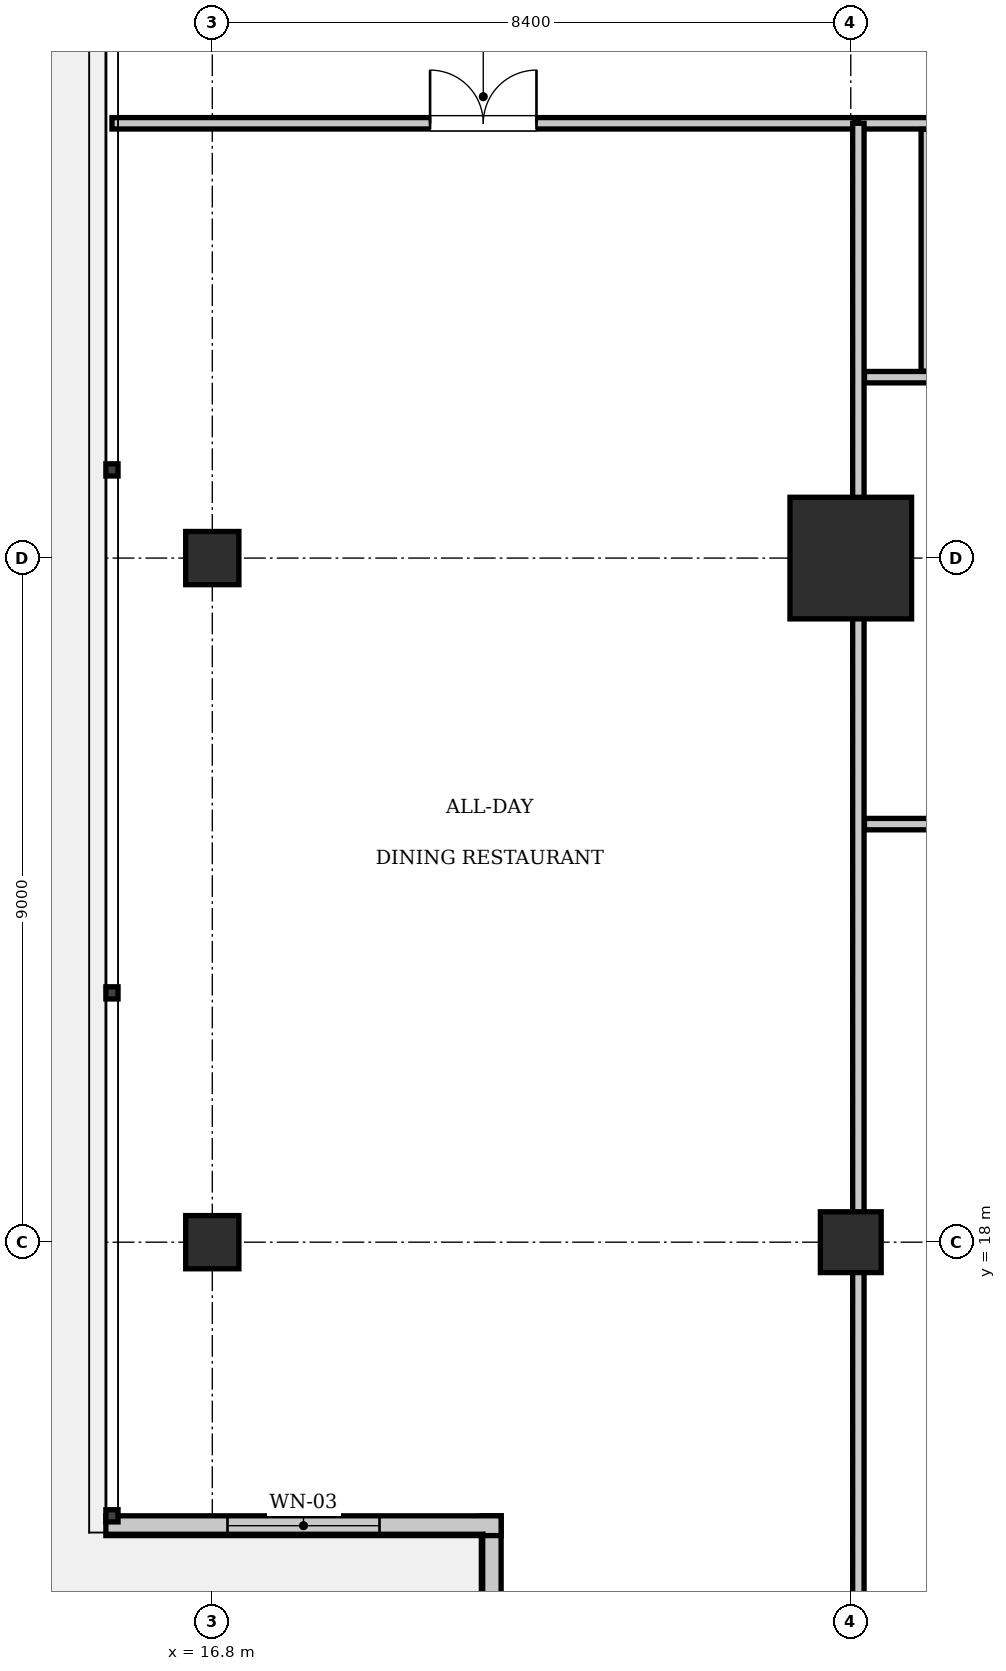
"""IFC4 building model, lengths in metres.
Left out: names, types, materials, properties, quantities, classifications, styles, units other than length and angle.
Written with IfcOpenShell. Run it as: python <this file> out.ifc"""

import sys

from ifc_helpers import new_model, si_unit, direction, frame, frame_2d, origin, origin_2d, place, context, subcontext, project, spatial, rectangle, extrude, element, fill, save


model = new_model("IFC4")
c1 = context("Model", 3, precision=1e-05, world=origin(), true_north=direction((0.0, 1.0)))
c2 = subcontext(c1, "Body", "Model", "MODEL_VIEW")
j1 = project(units=[si_unit("LENGTHUNIT", "METRE"), si_unit("PLANEANGLEUNIT", "RADIAN")], contexts=[c1])
p1 = place(None, origin())
s1 = spatial("IfcSite", under=j1, at=p1, CompositionType="ELEMENT")
p2 = place(p1, origin())
s2 = spatial("IfcBuilding", under=s1, at=p2, CompositionType="ELEMENT")
p3 = place(p2, frame((0.0, 0.0, 234.5)))
s3 = spatial("IfcBuildingStorey", under=s2, at=p3, CompositionType="ELEMENT", Elevation=234.5)
p4 = place(p3, frame((25.2, 27.0, 0.0), z_axis=(0.0, 0.0, 1.0), x_axis=(1.0, 0.0, 0.0)))
e1 = element("IfcColumn", 1, at=p4, inside=s3, PredefinedType="COLUMN", context=c2, shape_type="SweptSolid", body=[
    extrude(rectangle(XDim=1.6, YDim=1.6, at=origin_2d()), origin(), (0.0, 0.0, 1.0), 4.9),
])
p5 = place(p3, frame((25.2, 18.0, 0.0), z_axis=(0.0, 0.0, 1.0), x_axis=(1.0, 0.0, 0.0)))
e2 = element("IfcColumn", 2, at=p5, inside=s3, PredefinedType="COLUMN", context=c2, shape_type="SweptSolid", body=[
    extrude(rectangle(XDim=0.8, YDim=0.8, at=origin_2d()), origin(), (0.0, 0.0, 1.0), 4.9),
])
for number, where, z_axis, x_axis in (
    (3, (16.8, 18.0, 0.0), (0.0, 0.0, 1.0), (1.0, 0.0, 0.0)),
    (4, (16.8, 27.0, 0.0), (0.0, 0.0, 1.0), (1.0, 0.0, 0.0)),
):
    element("IfcColumn", number, at=place(p3, frame(where, z_axis=z_axis, x_axis=x_axis)), inside=s3, PredefinedType="COLUMN", context=c2, shape_type="SweptSolid", body=[
        extrude(rectangle(XDim=0.7, YDim=0.7, at=origin_2d()), origin(), (0.0, 0.0, 1.0), 4.9),
    ])
p6 = place(p3, frame((20.47, 9.2, 0.0), z_axis=(0.0, 0.0, 1.0), x_axis=(0.0, 1.0, 0.0)))
e5 = element("IfcWall", 5, at=p6, inside=s3, PredefinedType="SOLIDWALL", context=c2, shape_type="SweptSolid", body=[
    extrude(rectangle(XDim=5.2, YDim=0.26, at=frame_2d((2.6, 0.0))), origin(), (0.0, 0.0, 1.0), 4.66),
])
p7 = place(p3, frame((20.6, 14.27, 0.0), z_axis=(0.0, 0.0, 1.0), x_axis=(-1.0, 0.0, 0.0)))
e6 = element("IfcWall", 6, at=p7, inside=s3, PredefinedType="SOLIDWALL", context=c2, shape_type="SweptSolid", body=[
    extrude(rectangle(XDim=5.2, YDim=0.26, at=frame_2d((2.6, 0.0))), origin(), (0.0, 0.0, 1.0), 4.66),
])
p8 = place(p7, frame((1.6, 0.0, 0.9)))
e7 = element("IfcOpeningElement", 7, at=p8, cuts=e6, PredefinedType="OPENING", context=c2, shape_type="SweptSolid", body=[
    extrude(rectangle(XDim=2.0, YDim=2.2, at=frame_2d((1.0, 1.1))), frame((0.0, 0.14, 0.0), z_axis=(0.0, -1.0, 0.0), x_axis=(1.0, 0.0, 0.0)), (0.0, 0.0, 1.0), 0.28),
])
p9 = place(p3, frame((25.3, 32.72, 0.0), z_axis=(0.0, 0.0, 1.0), x_axis=(1.0, 0.0, 0.0)))
e8 = element("IfcWall", 8, at=p9, inside=s3, PredefinedType="PARTITIONING", context=c2, shape_type="SweptSolid", body=[
    extrude(rectangle(XDim=3.88, YDim=0.15, at=frame_2d((1.94, 0.0))), origin(), (0.0, 0.0, 1.0), 4.66),
])
p10 = place(p9, frame((1.2, 0.0, 0.0)))
e9 = element("IfcOpeningElement", 9, at=p10, cuts=e8, PredefinedType="OPENING", context=c2, shape_type="SweptSolid", body=[
    extrude(rectangle(XDim=0.9, YDim=2.1, at=frame_2d((0.45, 1.05))), frame((0.0, 0.085, 0.0), z_axis=(0.0, -1.0, 0.0), x_axis=(1.0, 0.0, 0.0)), (0.0, 0.0, 1.0), 0.17),
])
p11 = place(p3, frame((25.38, 29.38, 0.0), z_axis=(0.0, 0.0, 1.0), x_axis=(1.0, 0.0, 0.0)))
e10 = element("IfcWall", 10, at=p11, inside=s3, PredefinedType="PARTITIONING", context=c2, shape_type="SweptSolid", body=[
    extrude(rectangle(XDim=6.54, YDim=0.15, at=frame_2d((3.27, 0.0))), origin(), (0.0, 0.0, 1.0), 4.66),
])
p12 = place(p3, frame((26.2, 29.46, 0.0), z_axis=(0.0, 0.0, 1.0), x_axis=(0.0, 1.0, 0.0)))
e11 = element("IfcWall", 11, at=p12, inside=s3, PredefinedType="PARTITIONING", context=c2, shape_type="SweptSolid", body=[
    extrude(rectangle(XDim=3.18, YDim=0.15, at=frame_2d((1.59, 0.0))), origin(), (0.0, 0.0, 1.0), 4.66),
])
p13 = place(p3, frame((25.38, 23.5, 0.0), z_axis=(0.0, 0.0, 1.0), x_axis=(1.0, 0.0, 0.0)))
e12 = element("IfcWall", 12, at=p13, inside=s3, PredefinedType="PARTITIONING", context=c2, shape_type="SweptSolid", body=[
    extrude(rectangle(XDim=10.06, YDim=0.15, at=frame_2d((5.03, 0.0))), origin(), (0.0, 0.0, 1.0), 4.66),
])
p14 = place(p13, frame((7.2, 0.0, 0.0)))
e13 = element("IfcOpeningElement", 13, at=p14, cuts=e12, PredefinedType="OPENING", context=c2, shape_type="SweptSolid", body=[
    extrude(rectangle(XDim=1.6, YDim=2.3, at=frame_2d((0.8, 1.15))), frame((0.0, 0.085, 0.0), z_axis=(0.0, -1.0, 0.0), x_axis=(1.0, 0.0, 0.0)), (0.0, 0.0, 1.0), 0.17),
])
p15 = place(p3, frame((15.48, 32.72, 0.0), z_axis=(0.0, 0.0, 1.0), x_axis=(1.0, 0.0, 0.0)))
e14 = element("IfcWall", 14, at=p15, inside=s3, PredefinedType="PARTITIONING", context=c2, shape_type="SweptSolid", body=[
    extrude(rectangle(XDim=9.77, YDim=0.15, at=frame_2d((4.885, 0.0))), origin(), (0.0, 0.0, 1.0), 4.66),
])
p16 = place(p15, frame((4.185, 0.0, 0.0)))
e15 = element("IfcOpeningElement", 15, at=p16, cuts=e14, PredefinedType="OPENING", context=c2, shape_type="SweptSolid", body=[
    extrude(rectangle(XDim=1.4, YDim=2.2, at=frame_2d((0.7, 1.1))), frame((0.0, 0.085, 0.0), z_axis=(0.0, -1.0, 0.0), x_axis=(1.0, 0.0, 0.0)), (0.0, 0.0, 1.0), 0.17),
])
p17 = place(p3, frame((25.3, 9.28, 0.0), z_axis=(0.0, 0.0, 1.0), x_axis=(0.0, 1.0, 0.0)))
e16 = element("IfcWall", 16, at=p17, inside=s3, PredefinedType="PARTITIONING", context=c2, shape_type="SweptSolid", body=[
    extrude(rectangle(XDim=23.44, YDim=0.15, at=frame_2d((11.72, 0.0))), origin(), (0.0, 0.0, 1.0), 4.127),
])
p18 = place(p8, origin())
e17 = element("IfcWindow", 17, at=p18, inside=s3, PartitioningType="SINGLE_PANEL", PredefinedType="WINDOW", context=c2, shape_type="SweptSolid", body=[
    extrude(rectangle(XDim=2.0, YDim=2.2, at=frame_2d((1.0, 1.1))), frame((0.0, 0.03, 0.0), z_axis=(0.0, -1.0, 0.0), x_axis=(1.0, 0.0, 0.0)), (0.0, 0.0, 1.0), 0.06),
])
fill(e7, e17)
p19 = place(p16, origin())
e18 = element("IfcDoor", 18, at=p19, inside=s3, OperationType="DOUBLE_DOOR_SINGLE_SWING", PredefinedType="DOOR", context=c2, shape_type="SweptSolid", body=[
    extrude(rectangle(XDim=1.4, YDim=2.2, at=frame_2d((0.7, 1.1))), frame((0.0, 0.025, 0.0), z_axis=(0.0, -1.0, 0.0), x_axis=(1.0, 0.0, 0.0)), (0.0, 0.0, 1.0), 0.05),
])
fill(e15, e18)
save(model, sys.argv[1])
